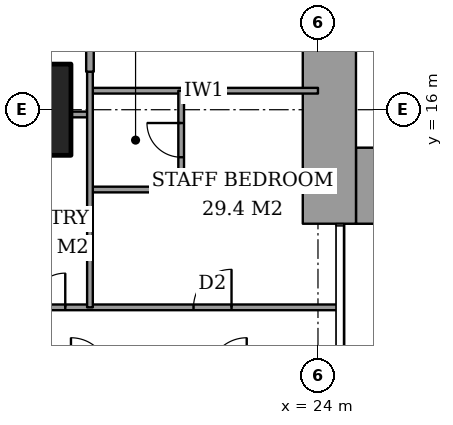
"""IFC4 building model, lengths in metres.
Left out: names, types, materials, properties, quantities, classifications, styles, units other than length and angle.
Written with IfcOpenShell. Run it as: python <this file> out.ifc"""

import sys

from ifc_helpers import new_model, si_unit, direction, frame, frame_2d, origin, origin_2d, place, context, subcontext, project, spatial, rectangle, extrude, element, fill, save


model = new_model("IFC4")
c1 = context("Model", 3, precision=1e-05, world=origin(), true_north=direction((0.0, 1.0)))
c2 = subcontext(c1, "Body", "Model", "MODEL_VIEW")
j1 = project(units=[si_unit("LENGTHUNIT", "METRE"), si_unit("PLANEANGLEUNIT", "RADIAN")], contexts=[c1])
p1 = place(None, origin())
s1 = spatial("IfcSite", under=j1, at=p1, CompositionType="ELEMENT")
p2 = place(p1, origin())
s2 = spatial("IfcBuilding", under=s1, at=p2, CompositionType="ELEMENT")
p3 = place(p2, frame((0.0, 0.0, 99.8)))
s3 = spatial("IfcBuildingStorey", under=s2, at=p3, CompositionType="ELEMENT", Elevation=99.8)
p4 = place(p3, frame((16.0, 16.0, 0.0), z_axis=(0.0, 0.0, 1.0), x_axis=(1.0, 0.0, 0.0)))
e1 = element("IfcColumn", 1, at=p4, inside=s3, PredefinedType="COLUMN", context=c2, shape_type="SweptSolid", body=[
    extrude(rectangle(XDim=3.0, YDim=2.4, at=origin_2d()), origin(), (0.0, 0.0, 1.0), 3.6),
])
p5 = place(p3, frame((25.0, 14.0, 0.0), z_axis=(0.0, 0.0, 1.0), x_axis=(1.0, 0.0, 0.0)))
e2 = element("IfcWall", 2, at=p5, inside=s3, PredefinedType="SHEAR", context=c2, shape_type="SweptSolid", body=[
    extrude(rectangle(XDim=3.15, YDim=2.0, at=frame_2d((1.575, 0.0))), origin(), (0.0, 0.0, 1.0), 3.6),
])
p6 = place(p3, frame((24.3, 13.0, 0.0), z_axis=(0.0, 0.0, 1.0), x_axis=(0.0, 1.0, 0.0)))
e3 = element("IfcWall", 3, at=p6, inside=s3, PredefinedType="SHEAR", context=c2, shape_type="SweptSolid", body=[
    extrude(rectangle(XDim=10.15, YDim=1.4, at=frame_2d((5.075, 0.0))), origin(), (0.0, 0.0, 1.0), 3.6),
])
p7 = place(p3, frame((-0.45, 10.8, 0.0), z_axis=(0.0, 0.0, 1.0), x_axis=(1.0, 0.0, 0.0)))
e4 = element("IfcWall", 4, at=p7, inside=s3, PredefinedType="PARTITIONING", context=c2, shape_type="SweptSolid", body=[
    extrude(rectangle(XDim=25.011, YDim=0.15, at=frame_2d((12.505, 0.0))), origin(), (0.0, 0.0, 1.0), 3.35),
])
p8 = place(p7, frame((12.05, 0.0, 0.0)))
e5 = element("IfcOpeningElement", 5, at=p8, cuts=e4, PredefinedType="OPENING", context=c2, shape_type="SweptSolid", body=[
    extrude(rectangle(XDim=1.0, YDim=2.1, at=frame_2d((0.5, 1.05))), frame((0.0, 0.085, 0.0), z_axis=(0.0, -1.0, 0.0), x_axis=(1.0, 0.0, 0.0)), (0.0, 0.0, 1.0), 0.17),
])
p9 = place(p7, frame((3.087, 0.0, 0.0)))
e6 = element("IfcOpeningElement", 6, at=p9, cuts=e4, PredefinedType="OPENING", context=c2, shape_type="SweptSolid", body=[
    extrude(rectangle(XDim=1.0, YDim=2.1, at=frame_2d((0.5, 1.05))), frame((0.0, 0.085, 0.0), z_axis=(0.0, -1.0, 0.0), x_axis=(1.0, 0.0, 0.0)), (0.0, 0.0, 1.0), 0.17),
])
p10 = place(p7, frame((8.863, 0.0, 0.0)))
e7 = element("IfcOpeningElement", 7, at=p10, cuts=e4, PredefinedType="OPENING", context=c2, shape_type="SweptSolid", body=[
    extrude(rectangle(XDim=0.9, YDim=2.1, at=frame_2d((0.45, 1.05))), frame((0.0, 0.085, 0.0), z_axis=(0.0, -1.0, 0.0), x_axis=(1.0, 0.0, 0.0)), (0.0, 0.0, 1.0), 0.17),
])
p11 = place(p7, frame((14.45, 0.0, 0.0)))
e8 = element("IfcOpeningElement", 8, at=p11, cuts=e4, PredefinedType="OPENING", context=c2, shape_type="SweptSolid", body=[
    extrude(rectangle(XDim=1.0, YDim=2.1, at=frame_2d((0.5, 1.05))), frame((0.0, 0.085, 0.0), z_axis=(0.0, -1.0, 0.0), x_axis=(1.0, 0.0, 0.0)), (0.0, 0.0, 1.0), 0.17),
])
p12 = place(p7, frame((16.9, 0.0, 0.0)))
e9 = element("IfcOpeningElement", 9, at=p12, cuts=e4, PredefinedType="OPENING", context=c2, shape_type="SweptSolid", body=[
    extrude(rectangle(XDim=0.9, YDim=2.1, at=frame_2d((0.45, 1.05))), frame((0.0, 0.085, 0.0), z_axis=(0.0, -1.0, 0.0), x_axis=(1.0, 0.0, 0.0)), (0.0, 0.0, 1.0), 0.17),
])
p13 = place(p7, frame((21.175, 0.0, 0.0)))
e10 = element("IfcOpeningElement", 10, at=p13, cuts=e4, PredefinedType="OPENING", context=c2, shape_type="SweptSolid", body=[
    extrude(rectangle(XDim=1.0, YDim=2.1, at=frame_2d((0.5, 1.05))), frame((0.0, 0.085, 0.0), z_axis=(0.0, -1.0, 0.0), x_axis=(1.0, 0.0, 0.0)), (0.0, 0.0, 1.0), 0.17),
])
p14 = place(p3, frame((18.0, 13.9, 0.0), z_axis=(0.0, 0.0, 1.0), x_axis=(1.0, 0.0, 0.0)))
e11 = element("IfcWall", 11, at=p14, inside=s3, PredefinedType="PARTITIONING", context=c2, shape_type="SweptSolid", body=[
    extrude(rectangle(XDim=2.4, YDim=0.15, at=frame_2d((1.2, 0.0))), origin(), (0.0, 0.0, 1.0), 3.35),
])
p15 = place(p3, frame((17.5, 15.875, 0.0), z_axis=(0.0, 0.0, 1.0), x_axis=(1.0, 0.0, 0.0)))
e12 = element("IfcWall", 12, at=p15, inside=s3, PredefinedType="PARTITIONING", context=c2, shape_type="SweptSolid", body=[
    extrude(rectangle(XDim=0.5, YDim=0.15, at=frame_2d((0.25, 0.0))), origin(), (0.0, 0.0, 1.0), 2.634),
])
p16 = place(p3, frame((18.0, 16.5, 0.0), z_axis=(0.0, 0.0, 1.0), x_axis=(1.0, 0.0, 0.0)))
e13 = element("IfcWall", 13, at=p16, inside=s3, PredefinedType="PARTITIONING", context=c2, shape_type="SweptSolid", body=[
    extrude(rectangle(XDim=6.0, YDim=0.15, at=frame_2d((3.0, 0.0))), origin(), (0.0, 0.0, 1.0), 3.35),
])
p17 = place(p3, frame((18.0, 17.0, 0.0), z_axis=(0.0, 0.0, 1.0), x_axis=(0.0, 1.0, 0.0)))
e14 = element("IfcWall", 14, at=p17, inside=s3, PredefinedType="PARTITIONING", context=c2, shape_type="SweptSolid", body=[
    extrude(rectangle(XDim=7.0, YDim=0.2, at=frame_2d((3.5, 0.0))), origin(), (0.0, 0.0, 1.0), 3.35),
])
p18 = place(p17, frame((4.4, 0.0, 0.0)))
e15 = element("IfcOpeningElement", 15, at=p18, cuts=e14, PredefinedType="OPENING", context=c2, shape_type="SweptSolid", body=[
    extrude(rectangle(XDim=1.2, YDim=2.4, at=frame_2d((0.6, 1.2))), frame((0.0, 0.11, 0.0), z_axis=(0.0, -1.0, 0.0), x_axis=(1.0, 0.0, 0.0)), (0.0, 0.0, 1.0), 0.22),
])
p19 = place(p17, frame((1.05, 0.0, 0.0)))
e16 = element("IfcOpeningElement", 16, at=p19, cuts=e14, PredefinedType="OPENING", context=c2, shape_type="SweptSolid", body=[
    extrude(rectangle(XDim=0.9, YDim=2.1, at=frame_2d((0.45, 1.05))), frame((0.0, 0.11, 0.0), z_axis=(0.0, -1.0, 0.0), x_axis=(1.0, 0.0, 0.0)), (0.0, 0.0, 1.0), 0.22),
])
p20 = place(p3, frame((18.0, 10.8, 0.0), z_axis=(0.0, 0.0, 1.0), x_axis=(0.0, 1.0, 0.0)))
e17 = element("IfcWall", 17, at=p20, inside=s3, PredefinedType="PARTITIONING", context=c2, shape_type="SweptSolid", body=[
    extrude(rectangle(XDim=6.2, YDim=0.15, at=frame_2d((3.1, 0.0))), origin(), (0.0, 0.0, 1.0), 3.35),
])
p21 = place(p3, frame((20.4, 13.9, 0.0), z_axis=(0.0, 0.0, 1.0), x_axis=(0.0, 1.0, 0.0)))
e18 = element("IfcWall", 18, at=p21, inside=s3, PredefinedType="PARTITIONING", context=c2, shape_type="SweptSolid", body=[
    extrude(rectangle(XDim=2.6, YDim=0.15, at=frame_2d((1.3, 0.0))), origin(), (0.0, 0.0, 1.0), 3.35),
])
p22 = place(p21, frame((0.85, 0.0, 0.0)))
e19 = element("IfcOpeningElement", 19, at=p22, cuts=e18, PredefinedType="OPENING", context=c2, shape_type="SweptSolid", body=[
    extrude(rectangle(XDim=0.9, YDim=2.1, at=frame_2d((0.45, 1.05))), frame((0.0, 0.085, 0.0), z_axis=(0.0, -1.0, 0.0), x_axis=(1.0, 0.0, 0.0)), (0.0, 0.0, 1.0), 0.17),
])
p23 = place(p12, origin())
e20 = element("IfcDoor", 20, at=p23, inside=s3, OperationType="SINGLE_SWING_LEFT", PredefinedType="DOOR", context=c2, shape_type="SweptSolid", body=[
    extrude(rectangle(XDim=0.9, YDim=2.1, at=frame_2d((0.45, 1.05))), frame((0.0, 0.025, 0.0), z_axis=(0.0, -1.0, 0.0), x_axis=(1.0, 0.0, 0.0)), (0.0, 0.0, 1.0), 0.05),
])
fill(e9, e20)
p24 = place(p22, origin())
e21 = element("IfcDoor", 21, at=p24, inside=s3, OperationType="SINGLE_SWING_LEFT", PredefinedType="DOOR", context=c2, shape_type="SweptSolid", body=[
    extrude(rectangle(XDim=0.9, YDim=2.1, at=frame_2d((0.45, 1.05))), frame((0.0, 0.025, 0.0), z_axis=(0.0, -1.0, 0.0), x_axis=(1.0, 0.0, 0.0)), (0.0, 0.0, 1.0), 0.05),
])
fill(e19, e21)
p25 = place(p13, origin())
e22 = element("IfcDoor", 22, at=p25, inside=s3, OperationType="SINGLE_SWING_LEFT", PredefinedType="DOOR", context=c2, shape_type="SweptSolid", body=[
    extrude(rectangle(XDim=1.0, YDim=2.1, at=frame_2d((0.5, 1.05))), frame((0.0, 0.025, 0.0), z_axis=(0.0, -1.0, 0.0), x_axis=(1.0, 0.0, 0.0)), (0.0, 0.0, 1.0), 0.05),
])
fill(e10, e22)
save(model, sys.argv[1])
